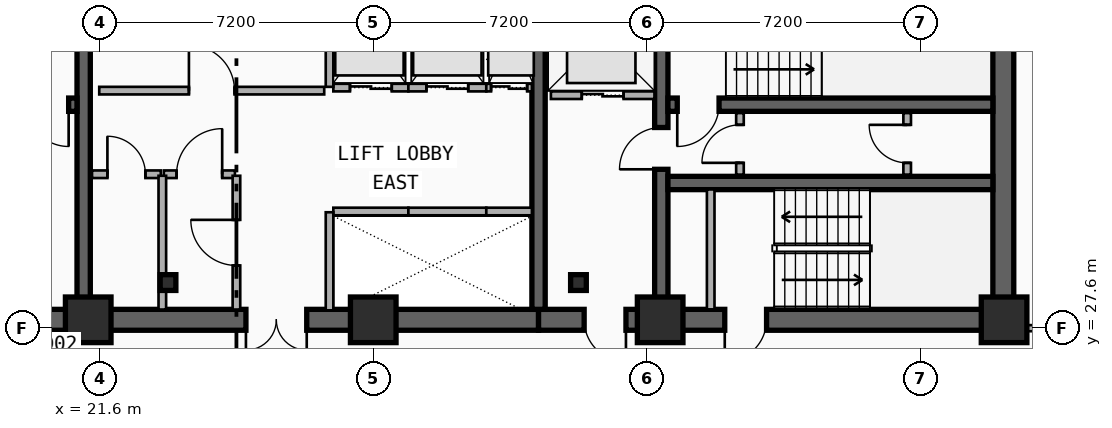
"""IFC4 building model, lengths in metres.
Left out: names, types, materials, properties, quantities, classifications, styles, units other than length and angle.
Written with IfcOpenShell. Run it as: python <this file> out.ifc"""

import sys

from ifc_helpers import new_model, si_unit, direction, frame, frame_2d, origin, origin_2d, place, context, subcontext, project, spatial, rectangle, i_section, extrude, element, fill, save


model = new_model("IFC4")
c1 = context("Model", 3, precision=1e-05, world=origin(), true_north=direction((0.0, 1.0)))
c2 = subcontext(c1, "Body", "Model", "MODEL_VIEW")
j1 = project(units=[si_unit("LENGTHUNIT", "METRE"), si_unit("PLANEANGLEUNIT", "RADIAN")], contexts=[c1])
p1 = place(None, origin())
s1 = spatial("IfcSite", under=j1, at=p1, CompositionType="ELEMENT")
p2 = place(p1, origin())
s2 = spatial("IfcBuilding", under=s1, at=p2, CompositionType="ELEMENT")
p3 = place(p2, frame((0.0, 0.0, 173.2)))
s3 = spatial("IfcBuildingStorey", under=s2, at=p3, CompositionType="ELEMENT", Elevation=173.2)
p4 = place(p3, frame((21.18, 27.82, 0.0), z_axis=(0.0, 0.0, 1.0), x_axis=(-1.0, 0.0, 0.0)))
e1 = element("IfcWall", 1, at=p4, inside=s3, PredefinedType="SHEAR", context=c2, shape_type="SweptSolid", body=[
    extrude(rectangle(XDim=9.03, YDim=0.55, at=frame_2d((4.515, 0.0))), origin(), (0.0, 0.0, 1.0), 3.55),
])
p5 = place(p4, frame((2.68, 0.0, 0.0)))
e2 = element("IfcOpeningElement", 2, at=p5, cuts=e1, PredefinedType="OPENING", context=c2, shape_type="SweptSolid", body=[
    extrude(rectangle(XDim=1.1, YDim=2.15, at=frame_2d((0.55, 1.075))), frame((0.0, 0.285, 0.0), z_axis=(0.0, -1.0, 0.0), x_axis=(1.0, 0.0, 0.0)), (0.0, 0.0, 1.0), 0.57),
])
p6 = place(p3, frame((33.15, 27.82, 0.0), z_axis=(0.0, 0.0, 1.0), x_axis=(-1.0, 0.0, 0.0)))
e3 = element("IfcWall", 3, at=p6, inside=s3, PredefinedType="SHEAR", context=c2, shape_type="SweptSolid", body=[
    extrude(rectangle(XDim=11.97, YDim=0.55, at=frame_2d((5.985, 0.0))), origin(), (0.0, 0.0, 1.0), 3.55),
])
p7 = place(p6, frame((6.1, 0.0, 0.0)))
e4 = element("IfcOpeningElement", 4, at=p7, cuts=e3, PredefinedType="OPENING", context=c2, shape_type="SweptSolid", body=[
    extrude(rectangle(XDim=1.6, YDim=2.2, at=frame_2d((0.8, 1.1))), frame((0.0, 0.285, 0.0), z_axis=(0.0, -1.0, 0.0), x_axis=(1.0, 0.0, 0.0)), (0.0, 0.0, 1.0), 0.57),
])
p8 = place(p3, frame((45.38, 27.82, 0.0), z_axis=(0.0, 0.0, 1.0), x_axis=(-1.0, 0.0, 0.0)))
e5 = element("IfcWall", 5, at=p8, inside=s3, PredefinedType="SHEAR", context=c2, shape_type="SweptSolid", body=[
    extrude(rectangle(XDim=12.23, YDim=0.55, at=frame_2d((6.115, 0.0))), origin(), (0.0, 0.0, 1.0), 3.55),
])
p9 = place(p8, frame((9.93, 0.0, 0.0)))
e6 = element("IfcOpeningElement", 6, at=p9, cuts=e5, PredefinedType="OPENING", context=c2, shape_type="SweptSolid", body=[
    extrude(rectangle(XDim=1.1, YDim=2.15, at=frame_2d((0.55, 1.075))), frame((0.0, 0.285, 0.0), z_axis=(0.0, -1.0, 0.0), x_axis=(1.0, 0.0, 0.0)), (0.0, 0.0, 1.0), 0.57),
])
p10 = place(p8, frame((6.23, 0.0, 0.0)))
e7 = element("IfcOpeningElement", 7, at=p10, cuts=e5, PredefinedType="OPENING", context=c2, shape_type="SweptSolid", body=[
    extrude(rectangle(XDim=1.1, YDim=2.15, at=frame_2d((0.55, 1.075))), frame((0.0, 0.285, 0.0), z_axis=(0.0, -1.0, 0.0), x_axis=(1.0, 0.0, 0.0)), (0.0, 0.0, 1.0), 0.57),
])
p11 = place(p3, frame((45.38, 28.095, 0.0), z_axis=(0.0, 0.0, 1.0), x_axis=(0.0, 1.0, 0.0)))
e8 = element("IfcWall", 8, at=p11, inside=s3, PredefinedType="SHEAR", context=c2, shape_type="SweptSolid", body=[
    extrude(rectangle(XDim=8.68, YDim=0.55, at=frame_2d((4.34, 0.0))), origin(), (0.0, 0.0, 1.0), 3.55),
])
for number, where, z_axis, x_axis in (
    (9, (21.18, 28.095, 0.0), (0.0, 0.0, 1.0), (0.0, 1.0, 0.0)),
    (10, (33.15, 28.095, 0.0), (0.0, 0.0, 1.0), (0.0, 1.0, 0.0)),
):
    element("IfcWall", number, at=place(p3, frame(where, z_axis=z_axis, x_axis=x_axis)), inside=s3, PredefinedType="SHEAR", context=c2, shape_type="SweptSolid", body=[
        extrude(rectangle(XDim=8.68, YDim=0.35, at=frame_2d((4.34, 0.0))), origin(), (0.0, 0.0, 1.0), 3.55),
    ])
p12 = place(p3, frame((36.38, 28.095, 0.0), z_axis=(0.0, 0.0, 1.0), x_axis=(0.0, 1.0, 0.0)))
e11 = element("IfcWall", 11, at=p12, inside=s3, PredefinedType="SHEAR", context=c2, shape_type="SweptSolid", body=[
    extrude(rectangle(XDim=8.68, YDim=0.35, at=frame_2d((4.34, 0.0))), origin(), (0.0, 0.0, 1.0), 3.55),
])
p13 = place(p12, frame((3.685, 0.0, 0.0)))
e12 = element("IfcOpeningElement", 12, at=p13, cuts=e11, PredefinedType="OPENING", context=c2, shape_type="SweptSolid", body=[
    extrude(rectangle(XDim=1.1, YDim=2.15, at=frame_2d((0.55, 1.075))), frame((0.0, 0.185, 0.0), z_axis=(0.0, -1.0, 0.0), x_axis=(1.0, 0.0, 0.0)), (0.0, 0.0, 1.0), 0.37),
])
p14 = place(p3, frame((21.005, 33.48, 0.0), z_axis=(0.0, 0.0, 1.0), x_axis=(-1.0, 0.0, 0.0)))
e13 = element("IfcWall", 13, at=p14, inside=s3, PredefinedType="SHEAR", context=c2, shape_type="SweptSolid", body=[
    extrude(rectangle(XDim=8.58, YDim=0.35, at=frame_2d((4.29, 0.0))), origin(), (0.0, 0.0, 1.0), 3.55),
])
p15 = place(p14, frame((0.22, 0.0, 0.0)))
e14 = element("IfcOpeningElement", 14, at=p15, cuts=e13, PredefinedType="OPENING", context=c2, shape_type="SweptSolid", body=[
    extrude(rectangle(XDim=1.1, YDim=2.15, at=frame_2d((0.55, 1.075))), frame((0.0, 0.185, 0.0), z_axis=(0.0, -1.0, 0.0), x_axis=(1.0, 0.0, 0.0)), (0.0, 0.0, 1.0), 0.37),
])
p16 = place(p3, frame((45.105, 33.48, 0.0), z_axis=(0.0, 0.0, 1.0), x_axis=(-1.0, 0.0, 0.0)))
e15 = element("IfcWall", 15, at=p16, inside=s3, PredefinedType="SHEAR", context=c2, shape_type="SweptSolid", body=[
    extrude(rectangle(XDim=8.55, YDim=0.35, at=frame_2d((4.275, 0.0))), origin(), (0.0, 0.0, 1.0), 3.55),
])
p17 = place(p16, frame((7.205, 0.0, 0.0)))
e16 = element("IfcOpeningElement", 16, at=p17, cuts=e15, PredefinedType="OPENING", context=c2, shape_type="SweptSolid", body=[
    extrude(rectangle(XDim=1.1, YDim=2.15, at=frame_2d((0.55, 1.075))), frame((0.0, 0.185, 0.0), z_axis=(0.0, -1.0, 0.0), x_axis=(1.0, 0.0, 0.0)), (0.0, 0.0, 1.0), 0.37),
])
p18 = place(p3, frame((36.555, 31.42, 0.0), z_axis=(0.0, 0.0, 1.0), x_axis=(1.0, 0.0, 0.0)))
e17 = element("IfcWall", 17, at=p18, inside=s3, PredefinedType="SHEAR", context=c2, shape_type="SweptSolid", body=[
    extrude(rectangle(XDim=8.55, YDim=0.35, at=frame_2d((4.275, 0.0))), origin(), (0.0, 0.0, 1.0), 3.55),
])
for number, where, z_axis, x_axis in (
    (18, (23.4, 28.8, 0.0), (0.0, 0.0, 1.0), (1.0, 0.0, 0.0)),
    (19, (34.2, 28.8, 0.0), (0.0, 0.0, 1.0), (1.0, 0.0, 0.0)),
):
    element("IfcColumn", number, at=place(p3, frame(where, z_axis=z_axis, x_axis=x_axis)), inside=s3, PredefinedType="COLUMN", context=c2, shape_type="SweptSolid", body=[
        extrude(i_section(OverallWidth=0.413, OverallDepth=0.415, WebThickness=0.03, FlangeThickness=0.047, FilletRadius=0.015, at=origin_2d()), origin(), (0.0, 0.0, 1.0), 3.55),
    ])
for number, where, z_axis, x_axis in (
    (20, (21.3, 27.82, 0.0), (0.0, 0.0, 1.0), (1.0, 0.0, 0.0)),
    (21, (28.8, 27.82, 0.0), (0.0, 0.0, 1.0), (1.0, 0.0, 0.0)),
    (22, (36.35, 27.82, 0.0), (0.0, 0.0, 1.0), (1.0, 0.0, 0.0)),
    (23, (45.4, 27.82, 0.0), (0.0, 0.0, 1.0), (1.0, 0.0, 0.0)),
):
    element("IfcColumn", number, at=place(p3, frame(where, z_axis=z_axis, x_axis=x_axis)), inside=s3, PredefinedType="COLUMN", context=c2, shape_type="SweptSolid", body=[
        extrude(rectangle(XDim=1.2, YDim=1.2, at=origin_2d()), origin(), (0.0, 0.0, 1.0), 3.55),
    ])
p19 = place(p3, frame((33.475, 33.73, 0.0), z_axis=(0.0, 0.0, 1.0), x_axis=(1.0, 0.0, 0.0)))
e24 = element("IfcWall", 24, at=p19, inside=s3, PredefinedType="PARTITIONING", context=c2, shape_type="SweptSolid", body=[
    extrude(rectangle(XDim=2.725, YDim=0.2, at=frame_2d((1.362, 0.0))), origin(), (0.0, 0.0, 1.0), 2.36),
])
p20 = place(p19, frame((0.812, 0.0, 0.0)))
e25 = element("IfcOpeningElement", 25, at=p20, cuts=e24, PredefinedType="OPENING", context=c2, shape_type="SweptSolid", body=[
    extrude(rectangle(XDim=1.1, YDim=2.15, at=frame_2d((0.55, 1.075))), frame((0.0, 0.11, 0.0), z_axis=(0.0, -1.0, 0.0), x_axis=(1.0, 0.0, 0.0)), (0.0, 0.0, 1.0), 0.22),
])
p21 = place(p3, frame((27.75, 30.67, 0.0), z_axis=(0.0, 0.0, 1.0), x_axis=(1.0, 0.0, 0.0)))
e26 = element("IfcWall", 26, at=p21, inside=s3, PredefinedType="PARTITIONING", context=c2, shape_type="SweptSolid", body=[
    extrude(rectangle(XDim=1.975, YDim=0.2, at=frame_2d((0.988, 0.0))), origin(), (0.0, 0.0, 1.0), 2.36),
])
p22 = place(p3, frame((27.65, 28.07, 0.0), z_axis=(0.0, 0.0, 1.0), x_axis=(0.0, 1.0, 0.0)))
e27 = element("IfcWall", 27, at=p22, inside=s3, PredefinedType="PARTITIONING", context=c2, shape_type="SweptSolid", body=[
    extrude(rectangle(XDim=2.58, YDim=0.2, at=frame_2d((1.29, 0.0))), origin(), (0.0, 0.0, 1.0), 2.36),
])
p23 = place(p3, frame((29.725, 30.67, 0.0), z_axis=(0.0, 0.0, 1.0), x_axis=(1.0, 0.0, 0.0)))
e28 = element("IfcWall", 28, at=p23, inside=s3, PredefinedType="PARTITIONING", context=c2, shape_type="SweptSolid", body=[
    extrude(rectangle(XDim=2.05, YDim=0.2, at=frame_2d((1.025, 0.0))), origin(), (0.0, 0.0, 1.0), 2.67),
])
p24 = place(p3, frame((31.775, 30.67, 0.0), z_axis=(0.0, 0.0, 1.0), x_axis=(1.0, 0.0, 0.0)))
e29 = element("IfcWall", 29, at=p24, inside=s3, PredefinedType="PARTITIONING", context=c2, shape_type="SweptSolid", body=[
    extrude(rectangle(XDim=1.2, YDim=0.2, at=frame_2d((0.6, 0.0))), origin(), (0.0, 0.0, 1.0), 2.67),
])
p25 = place(p3, frame((27.75, 33.93, 0.0), z_axis=(0.0, 0.0, 1.0), x_axis=(1.0, 0.0, 0.0)))
e30 = element("IfcWall", 30, at=p25, inside=s3, PredefinedType="PARTITIONING", context=c2, shape_type="SweptSolid", body=[
    extrude(rectangle(XDim=1.975, YDim=0.2, at=frame_2d((0.988, 0.0))), origin(), (0.0, 0.0, 1.0), 2.36),
])
p26 = place(p25, frame((0.438, 0.0, 0.0)))
e31 = element("IfcOpeningElement", 31, at=p26, cuts=e30, PredefinedType="OPENING", context=c2, shape_type="SweptSolid", body=[
    extrude(rectangle(XDim=1.1, YDim=2.15, at=frame_2d((0.55, 1.075))), frame((0.0, 0.11, 0.0), z_axis=(0.0, -1.0, 0.0), x_axis=(1.0, 0.0, 0.0)), (0.0, 0.0, 1.0), 0.22),
])
p27 = place(p3, frame((27.65, 33.95, 0.0), z_axis=(0.0, 0.0, 1.0), x_axis=(0.0, 1.0, 0.0)))
e32 = element("IfcWall", 32, at=p27, inside=s3, PredefinedType="PARTITIONING", context=c2, shape_type="SweptSolid", body=[
    extrude(rectangle(XDim=2.68, YDim=0.2, at=frame_2d((1.34, 0.0))), origin(), (0.0, 0.0, 1.0), 2.36),
])
p28 = place(p3, frame((29.725, 33.93, 0.0), z_axis=(0.0, 0.0, 1.0), x_axis=(1.0, 0.0, 0.0)))
e33 = element("IfcWall", 33, at=p28, inside=s3, PredefinedType="PARTITIONING", context=c2, shape_type="SweptSolid", body=[
    extrude(rectangle(XDim=2.05, YDim=0.2, at=frame_2d((1.025, 0.0))), origin(), (0.0, 0.0, 1.0), 3.29),
])
p29 = place(p28, frame((0.475, 0.0, 0.0)))
e34 = element("IfcOpeningElement", 34, at=p29, cuts=e33, PredefinedType="OPENING", context=c2, shape_type="SweptSolid", body=[
    extrude(rectangle(XDim=1.1, YDim=2.15, at=frame_2d((0.55, 1.075))), frame((0.0, 0.11, 0.0), z_axis=(0.0, -1.0, 0.0), x_axis=(1.0, 0.0, 0.0)), (0.0, 0.0, 1.0), 0.22),
])
p30 = place(p3, frame((31.775, 33.93, 0.0), z_axis=(0.0, 0.0, 1.0), x_axis=(1.0, 0.0, 0.0)))
e35 = element("IfcWall", 35, at=p30, inside=s3, PredefinedType="PARTITIONING", context=c2, shape_type="SweptSolid", body=[
    extrude(rectangle(XDim=1.2, YDim=0.2, at=frame_2d((0.6, 0.0))), origin(), (0.0, 0.0, 1.0), 3.29),
])
p31 = place(p30, frame((0.125, 0.0, 0.0)))
e36 = element("IfcOpeningElement", 36, at=p31, cuts=e35, PredefinedType="OPENING", context=c2, shape_type="SweptSolid", body=[
    extrude(rectangle(XDim=0.95, YDim=2.15, at=frame_2d((0.475, 1.075))), frame((0.0, 0.11, 0.0), z_axis=(0.0, -1.0, 0.0), x_axis=(1.0, 0.0, 0.0)), (0.0, 0.0, 1.0), 0.22),
])
p32 = place(p3, frame((37.68, 28.095, 0.0), z_axis=(0.0, 0.0, 1.0), x_axis=(0.0, 1.0, 0.0)))
e37 = element("IfcWall", 37, at=p32, inside=s3, PredefinedType="PARTITIONING", context=c2, shape_type="SweptSolid", body=[
    extrude(rectangle(XDim=3.155, YDim=0.2, at=frame_2d((1.578, 0.0))), origin(), (0.0, 0.0, 1.0), 2.67),
])
p33 = place(p3, frame((38.45, 31.64, 0.0), z_axis=(0.0, 0.0, 1.0), x_axis=(0.0, 1.0, 0.0)))
e38 = element("IfcWall", 38, at=p33, inside=s3, PredefinedType="PARTITIONING", context=c2, shape_type="SweptSolid", body=[
    extrude(rectangle(XDim=1.62, YDim=0.2, at=frame_2d((0.81, 0.0))), origin(), (0.0, 0.0, 1.0), 3.29),
])
p34 = place(p33, frame((0.31, 0.0, 0.0)))
e39 = element("IfcOpeningElement", 39, at=p34, cuts=e38, PredefinedType="OPENING", context=c2, shape_type="SweptSolid", body=[
    extrude(rectangle(XDim=1.0, YDim=2.15, at=frame_2d((0.5, 1.075))), frame((0.0, 0.11, 0.0), z_axis=(0.0, -1.0, 0.0), x_axis=(1.0, 0.0, 0.0)), (0.0, 0.0, 1.0), 0.22),
])
p35 = place(p3, frame((42.85, 31.64, 0.0), z_axis=(0.0, 0.0, 1.0), x_axis=(0.0, 1.0, 0.0)))
e40 = element("IfcWall", 40, at=p35, inside=s3, PredefinedType="PARTITIONING", context=c2, shape_type="SweptSolid", body=[
    extrude(rectangle(XDim=1.62, YDim=0.2, at=frame_2d((0.81, 0.0))), origin(), (0.0, 0.0, 1.0), 3.29),
])
p36 = place(p35, frame((0.31, 0.0, 0.0)))
e41 = element("IfcOpeningElement", 41, at=p36, cuts=e40, PredefinedType="OPENING", context=c2, shape_type="SweptSolid", body=[
    extrude(rectangle(XDim=1.0, YDim=2.15, at=frame_2d((0.5, 1.075))), frame((0.0, 0.11, 0.0), z_axis=(0.0, -1.0, 0.0), x_axis=(1.0, 0.0, 0.0)), (0.0, 0.0, 1.0), 0.22),
])
p37 = place(p3, frame((21.4, 31.65, 0.0), z_axis=(0.0, 0.0, 1.0), x_axis=(1.0, 0.0, 0.0)))
e42 = element("IfcWall", 42, at=p37, inside=s3, PredefinedType="PARTITIONING", context=c2, shape_type="SweptSolid", body=[
    extrude(rectangle(XDim=1.81, YDim=0.2, at=frame_2d((0.905, 0.0))), origin(), (0.0, 0.0, 1.0), 2.36),
])
p38 = place(p37, frame((0.405, 0.0, 0.0)))
e43 = element("IfcOpeningElement", 43, at=p38, cuts=e42, PredefinedType="OPENING", context=c2, shape_type="SweptSolid", body=[
    extrude(rectangle(XDim=1.0, YDim=2.15, at=frame_2d((0.5, 1.075))), frame((0.0, 0.11, 0.0), z_axis=(0.0, -1.0, 0.0), x_axis=(1.0, 0.0, 0.0)), (0.0, 0.0, 1.0), 0.22),
])
p39 = place(p3, frame((23.29, 31.65, 0.0), z_axis=(0.0, 0.0, 1.0), x_axis=(1.0, 0.0, 0.0)))
e44 = element("IfcWall", 44, at=p39, inside=s3, PredefinedType="PARTITIONING", context=c2, shape_type="SweptSolid", body=[
    extrude(rectangle(XDim=1.87, YDim=0.2, at=frame_2d((0.935, 0.0))), origin(), (0.0, 0.0, 1.0), 3.29),
])
p40 = place(p39, frame((0.335, 0.0, 0.0)))
e45 = element("IfcOpeningElement", 45, at=p40, cuts=e44, PredefinedType="OPENING", context=c2, shape_type="SweptSolid", body=[
    extrude(rectangle(XDim=1.2, YDim=2.15, at=frame_2d((0.6, 1.075))), frame((0.0, 0.11, 0.0), z_axis=(0.0, -1.0, 0.0), x_axis=(1.0, 0.0, 0.0)), (0.0, 0.0, 1.0), 0.22),
])
p41 = place(p3, frame((21.59, 33.85, 0.0), z_axis=(0.0, 0.0, 1.0), x_axis=(1.0, 0.0, 0.0)))
e46 = element("IfcWall", 46, at=p41, inside=s3, PredefinedType="PARTITIONING", context=c2, shape_type="SweptSolid", body=[
    extrude(rectangle(XDim=5.92, YDim=0.2, at=frame_2d((2.96, 0.0))), origin(), (0.0, 0.0, 1.0), 2.36),
])
p42 = place(p41, frame((2.36, 0.0, 0.0)))
e47 = element("IfcOpeningElement", 47, at=p42, cuts=e46, PredefinedType="OPENING", context=c2, shape_type="SweptSolid", body=[
    extrude(rectangle(XDim=1.2, YDim=2.15, at=frame_2d((0.6, 1.075))), frame((0.0, 0.11, 0.0), z_axis=(0.0, -1.0, 0.0), x_axis=(1.0, 0.0, 0.0)), (0.0, 0.0, 1.0), 0.22),
])
p43 = place(p3, frame((25.2, 28.09, 0.0), z_axis=(0.0, 0.0, 1.0), x_axis=(0.0, 1.0, 0.0)))
e48 = element("IfcWall", 48, at=p43, inside=s3, PredefinedType="PARTITIONING", context=c2, shape_type="SweptSolid", body=[
    extrude(rectangle(XDim=3.52, YDim=0.2, at=frame_2d((1.76, 0.0))), origin(), (0.0, 0.0, 1.0), 2.67),
])
p44 = place(p43, frame((1.16, 0.0, 0.0)))
e49 = element("IfcOpeningElement", 49, at=p44, cuts=e48, PredefinedType="OPENING", context=c2, shape_type="SweptSolid", body=[
    extrude(rectangle(XDim=1.2, YDim=2.15, at=frame_2d((0.6, 1.075))), frame((0.0, 0.11, 0.0), z_axis=(0.0, -1.0, 0.0), x_axis=(1.0, 0.0, 0.0)), (0.0, 0.0, 1.0), 0.22),
])
p45 = place(p3, frame((23.25, 28.09, 0.0), z_axis=(0.0, 0.0, 1.0), x_axis=(0.0, 1.0, 0.0)))
e50 = element("IfcWall", 50, at=p45, inside=s3, PredefinedType="PARTITIONING", context=c2, shape_type="SweptSolid", body=[
    extrude(rectangle(XDim=3.52, YDim=0.2, at=frame_2d((1.76, 0.0))), origin(), (0.0, 0.0, 1.0), 2.67),
])
p46 = place(p3, frame((45.41, 27.6, 0.0), z_axis=(0.0, 0.0, 1.0), x_axis=(1.0, 0.0, 0.0)))
e51 = element("IfcWall", 51, at=p46, inside=s3, PredefinedType="PARTITIONING", context=c2, shape_type="SweptSolid", body=[
    extrude(rectangle(XDim=0.91, YDim=0.16, at=frame_2d((0.455, 0.0))), origin(), (0.0, 0.0, 1.0), 2.36),
])
p47 = place(p20, origin())
e52 = element("IfcDoor", 52, at=p47, inside=s3, OperationType="DOUBLE_DOOR_SLIDING", PredefinedType="DOOR", context=c2, shape_type="SweptSolid", body=[
    extrude(rectangle(XDim=1.1, YDim=2.15, at=frame_2d((0.55, 1.075))), frame((0.0, 0.025, 0.0), z_axis=(0.0, -1.0, 0.0), x_axis=(1.0, 0.0, 0.0)), (0.0, 0.0, 1.0), 0.05),
])
fill(e25, e52)
p48 = place(p26, origin())
e53 = element("IfcDoor", 53, at=p48, inside=s3, OperationType="DOUBLE_DOOR_SLIDING", PredefinedType="DOOR", context=c2, shape_type="SweptSolid", body=[
    extrude(rectangle(XDim=1.1, YDim=2.15, at=frame_2d((0.55, 1.075))), frame((0.0, 0.025, 0.0), z_axis=(0.0, -1.0, 0.0), x_axis=(1.0, 0.0, 0.0)), (0.0, 0.0, 1.0), 0.05),
])
fill(e31, e53)
p49 = place(p29, origin())
e54 = element("IfcDoor", 54, at=p49, inside=s3, OperationType="DOUBLE_DOOR_SLIDING", PredefinedType="DOOR", context=c2, shape_type="SweptSolid", body=[
    extrude(rectangle(XDim=1.1, YDim=2.15, at=frame_2d((0.55, 1.075))), frame((0.0, 0.025, 0.0), z_axis=(0.0, -1.0, 0.0), x_axis=(1.0, 0.0, 0.0)), (0.0, 0.0, 1.0), 0.05),
])
fill(e34, e54)
p50 = place(p31, origin())
e55 = element("IfcDoor", 55, at=p50, inside=s3, OperationType="DOUBLE_DOOR_SLIDING", PredefinedType="DOOR", context=c2, shape_type="SweptSolid", body=[
    extrude(rectangle(XDim=0.95, YDim=2.15, at=frame_2d((0.475, 1.075))), frame((0.0, 0.025, 0.0), z_axis=(0.0, -1.0, 0.0), x_axis=(1.0, 0.0, 0.0)), (0.0, 0.0, 1.0), 0.05),
])
fill(e36, e55)
p51 = place(p15, origin())
e56 = element("IfcDoor", 56, at=p51, inside=s3, OperationType="SINGLE_SWING_LEFT", PredefinedType="DOOR", context=c2, shape_type="SweptSolid", body=[
    extrude(rectangle(XDim=1.1, YDim=2.15, at=frame_2d((0.55, 1.075))), frame((0.0, 0.025, 0.0), z_axis=(0.0, -1.0, 0.0), x_axis=(1.0, 0.0, 0.0)), (0.0, 0.0, 1.0), 0.05),
])
fill(e14, e56)
p52 = place(p17, origin())
e57 = element("IfcDoor", 57, at=p52, inside=s3, OperationType="SINGLE_SWING_RIGHT", PredefinedType="DOOR", context=c2, shape_type="SweptSolid", body=[
    extrude(rectangle(XDim=1.1, YDim=2.15, at=frame_2d((0.55, 1.075))), frame((0.0, 0.025, 0.0), z_axis=(0.0, -1.0, 0.0), x_axis=(1.0, 0.0, 0.0)), (0.0, 0.0, 1.0), 0.05),
])
fill(e16, e57)
p53 = place(p13, origin())
e58 = element("IfcDoor", 58, at=p53, inside=s3, OperationType="SINGLE_SWING_LEFT", PredefinedType="DOOR", context=c2, shape_type="SweptSolid", body=[
    extrude(rectangle(XDim=1.1, YDim=2.15, at=frame_2d((0.55, 1.075))), frame((0.0, 0.025, 0.0), z_axis=(0.0, -1.0, 0.0), x_axis=(1.0, 0.0, 0.0)), (0.0, 0.0, 1.0), 0.05),
])
fill(e12, e58)
p54 = place(p9, origin())
e59 = element("IfcDoor", 59, at=p54, inside=s3, OperationType="SINGLE_SWING_LEFT", PredefinedType="DOOR", context=c2, shape_type="SweptSolid", body=[
    extrude(rectangle(XDim=1.1, YDim=2.15, at=frame_2d((0.55, 1.075))), frame((0.0, 0.025, 0.0), z_axis=(0.0, -1.0, 0.0), x_axis=(1.0, 0.0, 0.0)), (0.0, 0.0, 1.0), 0.05),
])
fill(e6, e59)
p55 = place(p10, origin())
e60 = element("IfcDoor", 60, at=p55, inside=s3, OperationType="SINGLE_SWING_RIGHT", PredefinedType="DOOR", context=c2, shape_type="SweptSolid", body=[
    extrude(rectangle(XDim=1.1, YDim=2.15, at=frame_2d((0.55, 1.075))), frame((0.0, 0.025, 0.0), z_axis=(0.0, -1.0, 0.0), x_axis=(1.0, 0.0, 0.0)), (0.0, 0.0, 1.0), 0.05),
])
fill(e7, e60)
p56 = place(p7, origin())
e61 = element("IfcDoor", 61, at=p56, inside=s3, OperationType="SINGLE_SWING_LEFT", PredefinedType="DOOR", context=c2, shape_type="SweptSolid", body=[
    extrude(rectangle(XDim=1.6, YDim=2.2, at=frame_2d((0.8, 1.1))), frame((0.0, 0.025, 0.0), z_axis=(0.0, -1.0, 0.0), x_axis=(1.0, 0.0, 0.0)), (0.0, 0.0, 1.0), 0.05),
])
fill(e4, e61)
p57 = place(p34, origin())
e62 = element("IfcDoor", 62, at=p57, inside=s3, OperationType="SINGLE_SWING_LEFT", PredefinedType="DOOR", context=c2, shape_type="SweptSolid", body=[
    extrude(rectangle(XDim=1.0, YDim=2.15, at=frame_2d((0.5, 1.075))), frame((0.0, 0.025, 0.0), z_axis=(0.0, -1.0, 0.0), x_axis=(1.0, 0.0, 0.0)), (0.0, 0.0, 1.0), 0.05),
])
fill(e39, e62)
p58 = place(p36, origin())
e63 = element("IfcDoor", 63, at=p58, inside=s3, OperationType="SINGLE_SWING_RIGHT", PredefinedType="DOOR", context=c2, shape_type="SweptSolid", body=[
    extrude(rectangle(XDim=1.0, YDim=2.15, at=frame_2d((0.5, 1.075))), frame((0.0, 0.025, 0.0), z_axis=(0.0, -1.0, 0.0), x_axis=(1.0, 0.0, 0.0)), (0.0, 0.0, 1.0), 0.05),
])
fill(e41, e63)
p59 = place(p38, origin())
e64 = element("IfcDoor", 64, at=p59, inside=s3, OperationType="SINGLE_SWING_LEFT", PredefinedType="DOOR", context=c2, shape_type="SweptSolid", body=[
    extrude(rectangle(XDim=1.0, YDim=2.15, at=frame_2d((0.5, 1.075))), frame((0.0, 0.025, 0.0), z_axis=(0.0, -1.0, 0.0), x_axis=(1.0, 0.0, 0.0)), (0.0, 0.0, 1.0), 0.05),
])
fill(e43, e64)
p60 = place(p40, origin())
e65 = element("IfcDoor", 65, at=p60, inside=s3, OperationType="SINGLE_SWING_RIGHT", PredefinedType="DOOR", context=c2, shape_type="SweptSolid", body=[
    extrude(rectangle(XDim=1.2, YDim=2.15, at=frame_2d((0.6, 1.075))), frame((0.0, 0.025, 0.0), z_axis=(0.0, -1.0, 0.0), x_axis=(1.0, 0.0, 0.0)), (0.0, 0.0, 1.0), 0.05),
])
fill(e45, e65)
p61 = place(p42, origin())
e66 = element("IfcDoor", 66, at=p61, inside=s3, OperationType="SINGLE_SWING_LEFT", PredefinedType="DOOR", context=c2, shape_type="SweptSolid", body=[
    extrude(rectangle(XDim=1.2, YDim=2.15, at=frame_2d((0.6, 1.075))), frame((0.0, 0.025, 0.0), z_axis=(0.0, -1.0, 0.0), x_axis=(1.0, 0.0, 0.0)), (0.0, 0.0, 1.0), 0.05),
])
fill(e47, e66)
p62 = place(p44, origin())
e67 = element("IfcDoor", 67, at=p62, inside=s3, OperationType="SINGLE_SWING_RIGHT", PredefinedType="DOOR", context=c2, shape_type="SweptSolid", body=[
    extrude(rectangle(XDim=1.2, YDim=2.15, at=frame_2d((0.6, 1.075))), frame((0.0, 0.025, 0.0), z_axis=(0.0, -1.0, 0.0), x_axis=(1.0, 0.0, 0.0)), (0.0, 0.0, 1.0), 0.05),
])
fill(e49, e67)
save(model, sys.argv[1])
